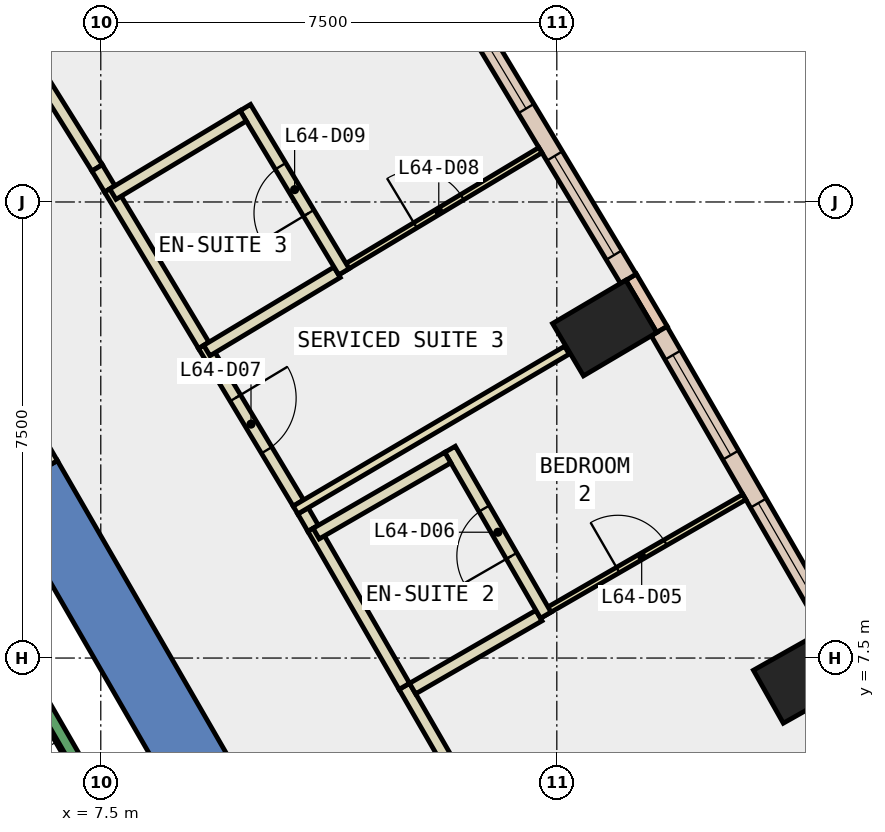
"""IFC4 building model, lengths in metres.
Left out: names, types, materials, properties, quantities, classifications, styles, units other than length and angle.
Written with IfcOpenShell. Run it as: python <this file> out.ifc"""

import sys

from ifc_helpers import new_model, si_unit, direction, frame, frame_2d, origin, origin_2d, place, context, subcontext, project, spatial, polyline, rectangle, outline, extrude, element, fill, save


model = new_model("IFC4")
c1 = context("Model", 3, precision=1e-05, world=origin(), true_north=direction((0.0, 1.0)))
c2 = subcontext(c1, "Body", "Model", "MODEL_VIEW")
j1 = project(units=[si_unit("LENGTHUNIT", "METRE"), si_unit("PLANEANGLEUNIT", "RADIAN")], contexts=[c1])
p1 = place(None, origin())
s1 = spatial("IfcSite", under=j1, at=p1, CompositionType="ELEMENT")
p2 = place(p1, origin())
s2 = spatial("IfcBuilding", under=s1, at=p2, CompositionType="ELEMENT")
p3 = place(p2, frame((0.0, 0.0, 277.4)))
s3 = spatial("IfcBuildingStorey", under=s2, at=p3, CompositionType="ELEMENT", Elevation=277.4)
for number, where, z_axis, x_axis in (
    (1, (19.089, 7.208, -0.34), (0.0, 0.0, 1.0), (-0.491, 0.871, 0.0)),
    (2, (15.787, 12.927, -0.34), (0.0, 0.0, 1.0), (-0.509, 0.861, 0.0)),
):
    element("IfcColumn", number, at=place(p3, frame(where, z_axis=z_axis, x_axis=x_axis)), inside=s3, PredefinedType="COLUMN", context=c2, shape_type="SweptSolid", body=[
        extrude(rectangle(XDim=1.0, YDim=1.4, at=origin_2d()), origin(), (0.0, 0.0, 1.0), 3.34),
    ])
p4 = place(p3, frame((0.0, 0.0, -0.34)))
e3 = element("IfcWall", 3, at=p4, inside=s3, PredefinedType="SHEAR", context=c2, shape_type="SweptSolid", body=[
    extrude(outline(polyline([(6.786, 10.747), (5.833, 10.197), (10.277, 2.5), (11.547, 2.5), (6.786, 10.747)])), origin(), (0.0, 0.0, 1.0), 3.34),
])
p5 = place(p3, frame((16.73, 12.904, 0.0), z_axis=(0.0, 0.0, 1.0), x_axis=(-0.508268432768, 0.861198699634, 0.0)))
e4 = element("IfcWall", 4, at=p5, inside=s3, PredefinedType="STANDARD", context=c2, shape_type="SweptSolid", body=[
    extrude(rectangle(XDim=1.0, YDim=0.2, at=frame_2d((0.5, 0.0))), origin(), (0.0, 0.0, 1.0), 3.0),
])
p6 = place(p3, frame((19.493, 8.008, 0.0), z_axis=(0.0, 0.0, 1.0), x_axis=(-0.49999685976, 0.866027216796, 0.0)))
e5 = element("IfcWall", 5, at=p6, inside=s3, PredefinedType="STANDARD", context=c2, shape_type="SweptSolid", body=[
    extrude(rectangle(XDim=5.622, YDim=0.3, at=frame_2d((2.811, 0.0))), origin(), (0.0, 0.0, 1.0), 3.0),
])
p7 = place(p6, frame((0.456, 0.0, 0.9)))
e6 = element("IfcOpeningElement", 6, at=p7, cuts=e5, PredefinedType="OPENING", context=c2, shape_type="SweptSolid", body=[
    extrude(rectangle(XDim=1.9, YDim=2.0, at=frame_2d((0.95, 1.0))), frame((0.0, 0.16, 0.0), z_axis=(0.0, -1.0, 0.0), x_axis=(1.0, 0.0, 0.0)), (0.0, 0.0, 1.0), 0.32),
])
p8 = place(p6, frame((3.267, 0.0, 0.9)))
e7 = element("IfcOpeningElement", 7, at=p8, cuts=e5, PredefinedType="OPENING", context=c2, shape_type="SweptSolid", body=[
    extrude(rectangle(XDim=1.9, YDim=2.0, at=frame_2d((0.95, 1.0))), frame((0.0, 0.16, 0.0), z_axis=(0.0, -1.0, 0.0), x_axis=(1.0, 0.0, 0.0)), (0.0, 0.0, 1.0), 0.32),
])
p9 = place(p3, frame((16.176, 13.737, 0.0), z_axis=(0.0, 0.0, 1.0), x_axis=(-0.515006791362, 0.857186096977, 0.0)))
e8 = element("IfcWall", 8, at=p9, inside=s3, PredefinedType="STANDARD", context=c2, shape_type="SweptSolid", body=[
    extrude(rectangle(XDim=5.619, YDim=0.3, at=frame_2d((2.81, 0.0))), origin(), (0.0, 0.0, 1.0), 3.0),
])
p10 = place(p9, frame((0.455, 0.0, 0.9)))
e9 = element("IfcOpeningElement", 9, at=p10, cuts=e8, PredefinedType="OPENING", context=c2, shape_type="SweptSolid", body=[
    extrude(rectangle(XDim=1.9, YDim=2.0, at=frame_2d((0.95, 1.0))), frame((0.0, 0.16, 0.0), z_axis=(0.0, -1.0, 0.0), x_axis=(1.0, 0.0, 0.0)), (0.0, 0.0, 1.0), 0.32),
])
p11 = place(p9, frame((3.265, 0.0, 0.9)))
e10 = element("IfcOpeningElement", 10, at=p11, cuts=e8, PredefinedType="OPENING", context=c2, shape_type="SweptSolid", body=[
    extrude(rectangle(XDim=1.9, YDim=2.0, at=frame_2d((0.95, 1.0))), frame((0.0, 0.16, 0.0), z_axis=(0.0, -1.0, 0.0), x_axis=(1.0, 0.0, 0.0)), (0.0, 0.0, 1.0), 0.32),
])
p12 = place(p3, frame((12.492, 7.035, 0.0), z_axis=(0.0, 0.0, 1.0), x_axis=(0.49999285859, -0.86602952684, 0.0)))
e11 = element("IfcWall", 11, at=p12, inside=s3, PredefinedType="PARTITIONING", context=c2, shape_type="SweptSolid", body=[
    extrude(rectangle(XDim=3.1, YDim=0.2, at=frame_2d((1.55, 0.0))), origin(), (0.0, 0.0, 1.0), 3.0),
])
p13 = place(p3, frame((10.826, 9.92, 0.0), z_axis=(0.0, 0.0, 1.0), x_axis=(0.5008910821, -0.865510325688, 0.0)))
e12 = element("IfcWall", 12, at=p13, inside=s3, PredefinedType="PARTITIONING", context=c2, shape_type="SweptSolid", body=[
    extrude(rectangle(XDim=0.332, YDim=0.2, at=frame_2d((0.166, 0.0))), origin(), (0.0, 0.0, 1.0), 3.0),
])
p14 = place(p3, frame((10.992, 9.633, 0.0), z_axis=(0.0, 0.0, 1.0), x_axis=(0.499990139034, -0.866031096941, 0.0)))
e13 = element("IfcWall", 13, at=p14, inside=s3, PredefinedType="PARTITIONING", context=c2, shape_type="SweptSolid", body=[
    extrude(rectangle(XDim=3.0, YDim=0.2, at=frame_2d((1.5, 0.0))), origin(), (0.0, 0.0, 1.0), 3.0),
])
p15 = place(p3, frame((9.192, 12.643, 0.0), z_axis=(0.0, 0.0, 1.0), x_axis=(0.51491096884, -0.857243660909, 0.0)))
e14 = element("IfcWall", 14, at=p15, inside=s3, PredefinedType="PARTITIONING", context=c2, shape_type="SweptSolid", body=[
    extrude(rectangle(XDim=3.026, YDim=0.2, at=frame_2d((1.513, 0.0))), origin(), (0.0, 0.0, 1.0), 3.0),
])
p16 = place(p15, frame((1.012, 0.0, 0.0)))
e15 = element("IfcOpeningElement", 15, at=p16, cuts=e14, PredefinedType="OPENING", context=c2, shape_type="SweptSolid", body=[
    extrude(rectangle(XDim=1.0, YDim=2.1, at=frame_2d((0.5, 1.05))), frame((0.0, 0.11, 0.0), z_axis=(0.0, -1.0, 0.0), x_axis=(1.0, 0.0, 0.0)), (0.0, 0.0, 1.0), 0.22),
])
p17 = place(p3, frame((4.085, 20.929, 0.0), z_axis=(0.0, 0.0, 1.0), x_axis=(0.530002406791, -0.847996137253, 0.0)))
e16 = element("IfcWall", 16, at=p17, inside=s3, PredefinedType="PARTITIONING", context=c2, shape_type="SweptSolid", body=[
    extrude(rectangle(XDim=6.33, YDim=0.2, at=frame_2d((3.165, 0.0))), origin(), (0.0, 0.0, 1.0), 3.0),
])
p18 = place(p3, frame((7.44, 15.561, 0.0), z_axis=(0.0, 0.0, 1.0), x_axis=(0.514229456049, -0.857652649114, 0.0)))
e17 = element("IfcWall", 17, at=p18, inside=s3, PredefinedType="PARTITIONING", context=c2, shape_type="SweptSolid", body=[
    extrude(rectangle(XDim=0.405, YDim=0.2, at=frame_2d((0.202, 0.0))), origin(), (0.0, 0.0, 1.0), 3.0),
])
p19 = place(p3, frame((7.648, 15.214, 0.0), z_axis=(0.0, 0.0, 1.0), x_axis=(0.515118014871, -0.857119262854, 0.0)))
e18 = element("IfcWall", 18, at=p19, inside=s3, PredefinedType="PARTITIONING", context=c2, shape_type="SweptSolid", body=[
    extrude(rectangle(XDim=3.0, YDim=0.2, at=frame_2d((1.5, 0.0))), origin(), (0.0, 0.0, 1.0), 3.0),
])
p20 = place(p3, frame((14.707, 8.198, 0.0), z_axis=(0.0, 0.0, 1.0), x_axis=(0.865995823051, 0.500051231833, 0.0)))
e19 = element("IfcWall", 19, at=p20, inside=s3, PredefinedType="PARTITIONING", context=c2, shape_type="SweptSolid", body=[
    extrude(rectangle(XDim=3.899, YDim=0.1, at=frame_2d((1.95, 0.0))), origin(), (0.0, 0.0, 1.0), 3.0),
])
p21 = place(p20, frame((1.5, 0.0, 0.0)))
e20 = element("IfcOpeningElement", 20, at=p21, cuts=e19, PredefinedType="OPENING", context=c2, shape_type="SweptSolid", body=[
    extrude(rectangle(XDim=0.9, YDim=2.1, at=frame_2d((0.45, 1.05))), frame((0.0, 0.06, 0.0), z_axis=(0.0, -1.0, 0.0), x_axis=(1.0, 0.0, 0.0)), (0.0, 0.0, 1.0), 0.12),
])
p22 = place(p3, frame((12.628, 6.998, 0.0), z_axis=(0.0, 0.0, 1.0), x_axis=(0.866100915363, 0.499869187296, 0.0)))
e21 = element("IfcWall", 21, at=p22, inside=s3, PredefinedType="PARTITIONING", context=c2, shape_type="SweptSolid", body=[
    extrude(rectangle(XDim=2.401, YDim=0.2, at=frame_2d((1.2, 0.0))), origin(), (0.0, 0.0, 1.0), 3.0),
])
p23 = place(p3, frame((14.818, 8.205, 0.0), z_axis=(0.0, 0.0, 1.0), x_axis=(-0.499807449307, 0.866136544441, 0.0)))
e22 = element("IfcWall", 22, at=p23, inside=s3, PredefinedType="PARTITIONING", context=c2, shape_type="SweptSolid", body=[
    extrude(rectangle(XDim=3.15, YDim=0.2, at=frame_2d((1.575, 0.0))), origin(), (0.0, 0.0, 1.0), 3.0),
])
p24 = place(p23, frame((1.125, 0.0, 0.0)))
e23 = element("IfcOpeningElement", 23, at=p24, cuts=e22, PredefinedType="OPENING", context=c2, shape_type="SweptSolid", body=[
    extrude(rectangle(XDim=0.9, YDim=2.1, at=frame_2d((0.45, 1.05))), frame((0.0, 0.11, 0.0), z_axis=(0.0, -1.0, 0.0), x_axis=(1.0, 0.0, 0.0)), (0.0, 0.0, 1.0), 0.22),
])
p25 = place(p3, frame((13.207, 10.796, 0.0), z_axis=(0.0, 0.0, 1.0), x_axis=(-0.866022959057, -0.500004234368, 0.0)))
e24 = element("IfcWall", 24, at=p25, inside=s3, PredefinedType="PARTITIONING", context=c2, shape_type="SweptSolid", body=[
    extrude(rectangle(XDim=2.5, YDim=0.2, at=frame_2d((1.25, 0.0))), origin(), (0.0, 0.0, 1.0), 3.0),
])
p26 = place(p3, frame((10.702, 9.934, 0.0), z_axis=(0.0, 0.0, 1.0), x_axis=(0.861684553056, 0.507444313225, 0.0)))
e25 = element("IfcWall", 25, at=p26, inside=s3, PredefinedType="PARTITIONING", context=c2, shape_type="SweptSolid", body=[
    extrude(rectangle(XDim=5.181, YDim=0.15, at=frame_2d((2.59, 0.0))), origin(), (0.0, 0.0, 1.0), 3.0),
])
p27 = place(p3, frame((11.387, 13.844, 0.0), z_axis=(0.0, 0.0, 1.0), x_axis=(0.857238721908, 0.514919191389, 0.0)))
e26 = element("IfcWall", 26, at=p27, inside=s3, PredefinedType="PARTITIONING", context=c2, shape_type="SweptSolid", body=[
    extrude(rectangle(XDim=3.9, YDim=0.1, at=frame_2d((1.95, 0.0))), origin(), (0.0, 0.0, 1.0), 3.0),
])
p28 = place(p27, frame((1.5, 0.0, 0.0)))
e27 = element("IfcOpeningElement", 27, at=p28, cuts=e26, PredefinedType="OPENING", context=c2, shape_type="SweptSolid", body=[
    extrude(rectangle(XDim=0.9, YDim=2.1, at=frame_2d((0.45, 1.05))), frame((0.0, 0.06, 0.0), z_axis=(0.0, -1.0, 0.0), x_axis=(1.0, 0.0, 0.0)), (0.0, 0.0, 1.0), 0.12),
])
p29 = place(p3, frame((9.244, 12.557, 0.0), z_axis=(0.0, 0.0, 1.0), x_axis=(0.857268798444, 0.514869116586, 0.0)))
e28 = element("IfcWall", 28, at=p29, inside=s3, PredefinedType="PARTITIONING", context=c2, shape_type="SweptSolid", body=[
    extrude(rectangle(XDim=2.5, YDim=0.2, at=frame_2d((1.25, 0.0))), origin(), (0.0, 0.0, 1.0), 3.0),
])
p30 = place(p3, frame((11.499, 13.853, 0.0), z_axis=(0.0, 0.0, 1.0), x_axis=(-0.514985817066, 0.857198698214, 0.0)))
e29 = element("IfcWall", 29, at=p30, inside=s3, PredefinedType="PARTITIONING", context=c2, shape_type="SweptSolid", body=[
    extrude(rectangle(XDim=3.15, YDim=0.2, at=frame_2d((1.575, 0.0))), origin(), (0.0, 0.0, 1.0), 3.0),
])
p31 = place(p30, frame((1.125, 0.0, 0.0)))
e30 = element("IfcOpeningElement", 30, at=p31, cuts=e29, PredefinedType="OPENING", context=c2, shape_type="SweptSolid", body=[
    extrude(rectangle(XDim=0.9, YDim=2.1, at=frame_2d((0.45, 1.05))), frame((0.0, 0.11, 0.0), z_axis=(0.0, -1.0, 0.0), x_axis=(1.0, 0.0, 0.0)), (0.0, 0.0, 1.0), 0.22),
])
p32 = place(p3, frame((9.842, 16.416, 0.0), z_axis=(0.0, 0.0, 1.0), x_axis=(-0.857268798444, -0.514869116586, 0.0)))
e31 = element("IfcWall", 31, at=p32, inside=s3, PredefinedType="PARTITIONING", context=c2, shape_type="SweptSolid", body=[
    extrude(rectangle(XDim=2.5, YDim=0.2, at=frame_2d((1.25, 0.0))), origin(), (0.0, 0.0, 1.0), 3.0),
])
p33 = place(p3, frame((6.699, 10.697, 0.0), z_axis=(0.0, 0.0, 1.0), x_axis=(-0.499914839587, 0.866074565589, 0.0)))
e32 = element("IfcWall", 32, at=p33, inside=s3, PredefinedType="PARTITIONING", context=c2, shape_type="SweptSolid", body=[
    extrude(rectangle(XDim=1.794, YDim=0.2, at=frame_2d((0.897, 0.0))), origin(), (0.0, 0.0, 1.0), 2.4),
])
p34 = place(p33, frame((0.397, 0.0, 0.0)))
e33 = element("IfcOpeningElement", 33, at=p34, cuts=e32, PredefinedType="OPENING", context=c2, shape_type="SweptSolid", body=[
    extrude(rectangle(XDim=1.0, YDim=2.1, at=frame_2d((0.5, 1.05))), frame((0.0, 0.11, 0.0), z_axis=(0.0, -1.0, 0.0), x_axis=(1.0, 0.0, 0.0)), (0.0, 0.0, 1.0), 0.22),
])
p35 = place(p3, frame((8.48, 3.412, 0.0), z_axis=(0.0, 0.0, 1.0), x_axis=(-0.499978703459, 0.866037698999, 0.0)))
e34 = element("IfcWall", 34, at=p35, inside=s3, PredefinedType="STANDARD", context=c2, shape_type="SweptSolid", body=[
    extrude(rectangle(XDim=6.9, YDim=0.2, at=frame_2d((3.45, 0.0))), origin(), (0.0, 0.0, 1.0), 3.0),
])
p36 = place(p7, origin())
e35 = element("IfcWindow", 35, at=p36, inside=s3, PartitioningType="SINGLE_PANEL", PredefinedType="WINDOW", context=c2, shape_type="SweptSolid", body=[
    extrude(rectangle(XDim=1.9, YDim=2.0, at=frame_2d((0.95, 1.0))), frame((0.0, 0.03, 0.0), z_axis=(0.0, -1.0, 0.0), x_axis=(1.0, 0.0, 0.0)), (0.0, 0.0, 1.0), 0.06),
])
fill(e6, e35)
p37 = place(p8, origin())
e36 = element("IfcWindow", 36, at=p37, inside=s3, PartitioningType="SINGLE_PANEL", PredefinedType="WINDOW", context=c2, shape_type="SweptSolid", body=[
    extrude(rectangle(XDim=1.9, YDim=2.0, at=frame_2d((0.95, 1.0))), frame((0.0, 0.03, 0.0), z_axis=(0.0, -1.0, 0.0), x_axis=(1.0, 0.0, 0.0)), (0.0, 0.0, 1.0), 0.06),
])
fill(e7, e36)
p38 = place(p10, origin())
e37 = element("IfcWindow", 37, at=p38, inside=s3, PartitioningType="SINGLE_PANEL", PredefinedType="WINDOW", context=c2, shape_type="SweptSolid", body=[
    extrude(rectangle(XDim=1.9, YDim=2.0, at=frame_2d((0.95, 1.0))), frame((0.0, 0.03, 0.0), z_axis=(0.0, -1.0, 0.0), x_axis=(1.0, 0.0, 0.0)), (0.0, 0.0, 1.0), 0.06),
])
fill(e9, e37)
p39 = place(p11, origin())
e38 = element("IfcWindow", 38, at=p39, inside=s3, PartitioningType="SINGLE_PANEL", PredefinedType="WINDOW", context=c2, shape_type="SweptSolid", body=[
    extrude(rectangle(XDim=1.9, YDim=2.0, at=frame_2d((0.95, 1.0))), frame((0.0, 0.03, 0.0), z_axis=(0.0, -1.0, 0.0), x_axis=(1.0, 0.0, 0.0)), (0.0, 0.0, 1.0), 0.06),
])
fill(e10, e38)
p40 = place(p21, origin())
e39 = element("IfcDoor", 39, at=p40, inside=s3, OperationType="SINGLE_SWING_LEFT", PredefinedType="DOOR", context=c2, shape_type="SweptSolid", body=[
    extrude(rectangle(XDim=0.9, YDim=2.1, at=frame_2d((0.45, 1.05))), frame((0.0, 0.025, 0.0), z_axis=(0.0, -1.0, 0.0), x_axis=(1.0, 0.0, 0.0)), (0.0, 0.0, 1.0), 0.05),
])
fill(e20, e39)
p41 = place(p24, origin())
e40 = element("IfcDoor", 40, at=p41, inside=s3, OperationType="SINGLE_SWING_RIGHT", PredefinedType="DOOR", context=c2, shape_type="SweptSolid", body=[
    extrude(rectangle(XDim=0.9, YDim=2.1, at=frame_2d((0.45, 1.05))), frame((0.0, 0.025, 0.0), z_axis=(0.0, -1.0, 0.0), x_axis=(1.0, 0.0, 0.0)), (0.0, 0.0, 1.0), 0.05),
])
fill(e23, e40)
p42 = place(p16, origin())
e41 = element("IfcDoor", 41, at=p42, inside=s3, OperationType="SINGLE_SWING_LEFT", PredefinedType="DOOR", context=c2, shape_type="SweptSolid", body=[
    extrude(rectangle(XDim=1.0, YDim=2.1, at=frame_2d((0.5, 1.05))), frame((0.0, 0.025, 0.0), z_axis=(0.0, -1.0, 0.0), x_axis=(1.0, 0.0, 0.0)), (0.0, 0.0, 1.0), 0.05),
])
fill(e15, e41)
p43 = place(p28, origin())
e42 = element("IfcDoor", 42, at=p43, inside=s3, OperationType="SINGLE_SWING_LEFT", PredefinedType="DOOR", context=c2, shape_type="SweptSolid", body=[
    extrude(rectangle(XDim=0.9, YDim=2.1, at=frame_2d((0.45, 1.05))), frame((0.0, 0.025, 0.0), z_axis=(0.0, -1.0, 0.0), x_axis=(1.0, 0.0, 0.0)), (0.0, 0.0, 1.0), 0.05),
])
fill(e27, e42)
p44 = place(p31, origin())
e43 = element("IfcDoor", 43, at=p44, inside=s3, OperationType="SINGLE_SWING_LEFT", PredefinedType="DOOR", context=c2, shape_type="SweptSolid", body=[
    extrude(rectangle(XDim=0.9, YDim=2.1, at=frame_2d((0.45, 1.05))), frame((0.0, 0.025, 0.0), z_axis=(0.0, -1.0, 0.0), x_axis=(1.0, 0.0, 0.0)), (0.0, 0.0, 1.0), 0.05),
])
fill(e30, e43)
save(model, sys.argv[1])
